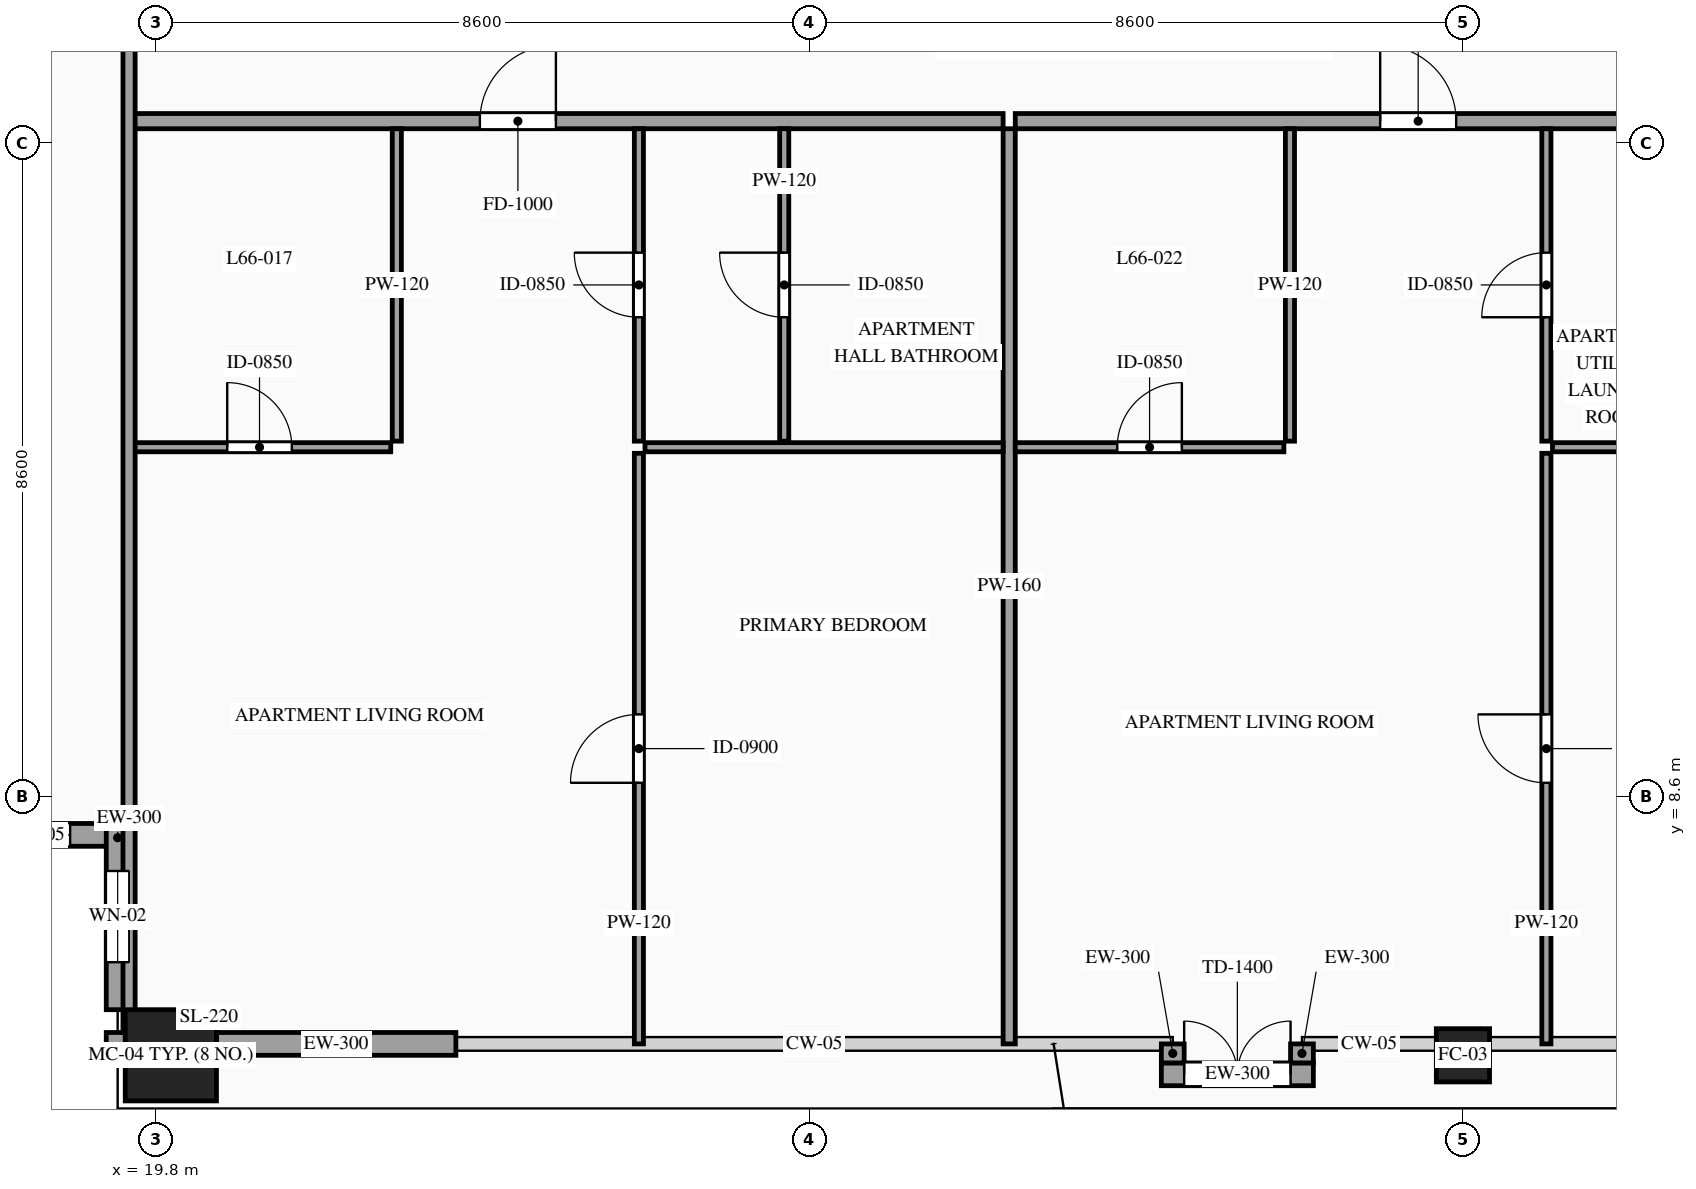
"""IFC4 building model, lengths in metres.
Left out: names, types, materials, properties, quantities, classifications, styles, units other than length and angle.
Written with IfcOpenShell. Run it as: python <this file> out.ifc"""

import sys

from ifc_helpers import new_model, si_unit, direction, frame, frame_2d, origin, origin_2d, place, context, subcontext, project, spatial, rectangle, hollow_rectangle, extrude, source, transform, mapped, element, fill, save


model = new_model("IFC4")
c1 = context("Model", 3, precision=1e-05, world=origin(), true_north=direction((0.0, 1.0)))
c2 = subcontext(c1, "Body", "Model", "MODEL_VIEW")
j1 = project(units=[si_unit("LENGTHUNIT", "METRE"), si_unit("PLANEANGLEUNIT", "RADIAN")], contexts=[c1])
p1 = place(None, origin())
s1 = spatial("IfcSite", under=j1, at=p1, CompositionType="ELEMENT")
p2 = place(p1, origin())
s2 = spatial("IfcBuilding", under=s1, at=p2, CompositionType="ELEMENT")
p3 = place(p2, frame((0.0, 0.0, 248.6)))
s3 = spatial("IfcBuildingStorey", under=s2, at=p3, CompositionType="ELEMENT", Elevation=248.6)
m1 = source(origin(), c2, "Body", "SweptSolid", [
    extrude(hollow_rectangle(XDim=1.2, YDim=1.2, WallThickness=0.055, at=origin_2d()), origin(), (0.0, 0.0, 1.0), 3.5),
])
p4 = place(p3, frame((20.0, 5.2, 0.0), z_axis=(0.0, 0.0, 1.0), x_axis=(1.0, 0.0, 0.0)))
e1 = element("IfcColumn", 1, at=p4, inside=s3, PredefinedType="COLUMN", context=c2, shape_type="MappedRepresentation", body=[
    mapped(m1, transform((0.0, 0.0, 0.0), scale=1.0)),
])
m2 = source(origin(), c2, "Body", "SweptSolid", [
    extrude(hollow_rectangle(XDim=0.7, YDim=0.7, WallThickness=0.032, at=origin_2d()), origin(), (0.0, 0.0, 1.0), 3.5),
])
p5 = place(p3, frame((37.0, 5.2, 0.0), z_axis=(0.0, 0.0, 1.0), x_axis=(1.0, 0.0, 0.0)))
e2 = element("IfcColumn", 2, at=p5, inside=s3, PredefinedType="COLUMN", context=c2, shape_type="MappedRepresentation", body=[
    mapped(m2, transform((0.0, 0.0, 0.0), scale=1.0)),
])
p6 = place(p3, frame((17.0, 8.1, 0.0), z_axis=(0.0, 0.0, 1.0), x_axis=(1.0, 0.0, 0.0)))
e3 = element("IfcWall", 3, at=p6, inside=s3, PredefinedType="SOLIDWALL", context=c2, shape_type="SweptSolid", body=[
    extrude(rectangle(XDim=2.45, YDim=0.3, at=frame_2d((1.225, 0.0))), origin(), (0.0, 0.0, 1.0), 3.28),
])
p7 = place(p6, frame((0.775, 0.0, 0.85)))
e4 = element("IfcOpeningElement", 4, at=p7, cuts=e3, PredefinedType="OPENING", context=c2, shape_type="SweptSolid", body=[
    extrude(rectangle(XDim=0.9, YDim=1.5, at=frame_2d((0.45, 0.75))), frame((0.0, 0.165, 0.0), z_axis=(0.0, -1.0, 0.0), x_axis=(1.0, 0.0, 0.0)), (0.0, 0.0, 1.0), 0.33),
])
p8 = place(p3, frame((19.3, 8.25, 0.0), z_axis=(0.0, 0.0, 1.0), x_axis=(0.0, -1.0, 0.0)))
e5 = element("IfcWall", 5, at=p8, inside=s3, PredefinedType="SOLIDWALL", context=c2, shape_type="SweptSolid", body=[
    extrude(rectangle(XDim=2.45, YDim=0.3, at=frame_2d((1.225, 0.0))), origin(), (0.0, 0.0, 1.0), 3.28),
])
p9 = place(p8, frame((0.625, 0.0, 0.85)))
e6 = element("IfcOpeningElement", 6, at=p9, cuts=e5, PredefinedType="OPENING", context=c2, shape_type="SweptSolid", body=[
    extrude(rectangle(XDim=1.2, YDim=2.1, at=frame_2d((0.6, 1.05))), frame((0.0, 0.165, 0.0), z_axis=(0.0, -1.0, 0.0), x_axis=(1.0, 0.0, 0.0)), (0.0, 0.0, 1.0), 0.33),
])
m3 = source(origin(), c2, "Body", "SweptSolid", [
    extrude(rectangle(XDim=0.25, YDim=0.3, at=frame_2d((0.125, 0.0))), origin(), (0.0, 0.0, 1.0), 3.28),
])
p10 = place(p3, frame((19.15, 5.35, 0.0), z_axis=(0.0, 0.0, 1.0), x_axis=(1.0, 0.0, 0.0)))
e7 = element("IfcWall", 7, at=p10, inside=s3, PredefinedType="SOLIDWALL", context=c2, shape_type="MappedRepresentation", body=[
    mapped(m3, transform((0.0, 0.0, 0.0), scale=1.0)),
])
m4 = source(origin(), c2, "Body", "SweptSolid", [
    extrude(rectangle(XDim=3.15, YDim=0.3, at=frame_2d((1.575, 0.0))), origin(), (0.0, 0.0, 1.0), 2.835),
])
p11 = place(p3, frame((20.6, 5.35, 0.0), z_axis=(0.0, 0.0, 1.0), x_axis=(1.0, 0.0, 0.0)))
e8 = element("IfcWall", 8, at=p11, inside=s3, PredefinedType="SOLIDWALL", context=c2, shape_type="MappedRepresentation", body=[
    mapped(m4, transform((0.0, 0.0, 0.0), scale=1.0)),
])
p12 = place(p3, frame((33.032, 4.95, 0.0), z_axis=(0.0, 0.0, 1.0), x_axis=(1.0, 0.0, 0.0)))
e9 = element("IfcWall", 9, at=p12, inside=s3, PredefinedType="SOLIDWALL", context=c2, shape_type="SweptSolid", body=[
    extrude(rectangle(XDim=2.0, YDim=0.3, at=frame_2d((1.0, 0.0))), origin(), (0.0, 0.0, 1.0), 2.835),
])
p13 = place(p12, frame((0.3, 0.0, 0.0)))
e10 = element("IfcOpeningElement", 10, at=p13, cuts=e9, PredefinedType="OPENING", context=c2, shape_type="SweptSolid", body=[
    extrude(rectangle(XDim=1.4, YDim=2.3, at=frame_2d((0.7, 1.15))), frame((0.0, 0.165, 0.0), z_axis=(0.0, -1.0, 0.0), x_axis=(1.0, 0.0, 0.0)), (0.0, 0.0, 1.0), 0.33),
])
for number, where, z_axis, x_axis in (
    (11, (33.182, 5.35, 0.0), (0.0, 0.0, 1.0), (0.0, -1.0, 0.0)),
    (12, (34.882, 5.1, 0.0), (0.0, 0.0, 1.0), (0.0, 1.0, 0.0)),
):
    element("IfcWall", number, at=place(p3, frame(where, z_axis=z_axis, x_axis=x_axis)), inside=s3, PredefinedType="SOLIDWALL", context=c2, shape_type="MappedRepresentation", body=[
        mapped(m3, transform((0.0, 0.0, 0.0), scale=1.0)),
    ])
p14 = place(p3, frame((19.44, 17.49, 0.0), z_axis=(0.0, 0.0, 1.0), x_axis=(1.0, 0.0, 0.0)))
e13 = element("IfcWall", 13, at=p14, inside=s3, PredefinedType="PARTITIONING", context=c2, shape_type="SweptSolid", body=[
    extrude(rectangle(XDim=11.51, YDim=0.2, at=frame_2d((5.755, 0.0))), origin(), (0.0, 0.0, 1.0), 3.28),
])
p15 = place(p14, frame((4.626, 0.0, 0.0)))
e14 = element("IfcOpeningElement", 14, at=p15, cuts=e13, PredefinedType="OPENING", context=c2, shape_type="SweptSolid", body=[
    extrude(rectangle(XDim=1.0, YDim=2.2, at=frame_2d((0.5, 1.1))), frame((0.0, 0.115, 0.0), z_axis=(0.0, -1.0, 0.0), x_axis=(1.0, 0.0, 0.0)), (0.0, 0.0, 1.0), 0.23),
])
m5 = source(origin(), c2, "Body", "SweptSolid", [
    extrude(rectangle(XDim=12.04, YDim=0.16, at=frame_2d((6.02, 0.0))), origin(), (0.0, 0.0, 1.0), 3.28),
])
p16 = place(p3, frame((31.03, 5.35, 0.0), z_axis=(0.0, 0.0, 1.0), x_axis=(0.0, 1.0, 0.0)))
e15 = element("IfcWall", 15, at=p16, inside=s3, PredefinedType="PARTITIONING", context=c2, shape_type="MappedRepresentation", body=[
    mapped(m5, transform((0.0, 0.0, 0.0), scale=1.0)),
])
p17 = place(p3, frame((19.44, 13.2, 0.0), z_axis=(0.0, 0.0, 1.0), x_axis=(1.0, 0.0, 0.0)))
e16 = element("IfcWall", 16, at=p17, inside=s3, PredefinedType="PARTITIONING", context=c2, shape_type="SweptSolid", body=[
    extrude(rectangle(XDim=3.453, YDim=0.12, at=frame_2d((1.727, 0.0))), origin(), (0.0, 0.0, 1.0), 3.28),
])
p18 = place(p17, frame((1.302, 0.0, 0.0)))
e17 = element("IfcOpeningElement", 17, at=p18, cuts=e16, PredefinedType="OPENING", context=c2, shape_type="SweptSolid", body=[
    extrude(rectangle(XDim=0.85, YDim=2.1, at=frame_2d((0.425, 1.05))), frame((0.0, 0.075, 0.0), z_axis=(0.0, -1.0, 0.0), x_axis=(1.0, 0.0, 0.0)), (0.0, 0.0, 1.0), 0.15),
])
m6 = source(origin(), c2, "Body", "SweptSolid", [
    extrude(rectangle(XDim=4.11, YDim=0.12, at=frame_2d((2.055, 0.0))), origin(), (0.0, 0.0, 1.0), 3.28),
])
p19 = place(p3, frame((22.973, 13.28, 0.0), z_axis=(0.0, 0.0, 1.0), x_axis=(0.0, 1.0, 0.0)))
e18 = element("IfcWall", 18, at=p19, inside=s3, PredefinedType="PARTITIONING", context=c2, shape_type="MappedRepresentation", body=[
    mapped(m6, transform((0.0, 0.0, 0.0), scale=1.0)),
])
p20 = place(p3, frame((28.07, 13.28, 0.0), z_axis=(0.0, 0.0, 1.0), x_axis=(0.0, 1.0, 0.0)))
e19 = element("IfcWall", 19, at=p20, inside=s3, PredefinedType="PARTITIONING", context=c2, shape_type="SweptSolid", body=[
    extrude(rectangle(XDim=4.11, YDim=0.12, at=frame_2d((2.055, 0.0))), origin(), (0.0, 0.0, 1.0), 3.28),
])
p21 = place(p20, frame((1.63, 0.0, 0.0)))
e20 = element("IfcOpeningElement", 20, at=p21, cuts=e19, PredefinedType="OPENING", context=c2, shape_type="SweptSolid", body=[
    extrude(rectangle(XDim=0.85, YDim=2.1, at=frame_2d((0.425, 1.05))), frame((0.0, 0.075, 0.0), z_axis=(0.0, -1.0, 0.0), x_axis=(1.0, 0.0, 0.0)), (0.0, 0.0, 1.0), 0.15),
])
m7 = source(origin(), c2, "Body", "SweptSolid", [
    extrude(rectangle(XDim=4.712, YDim=0.12, at=frame_2d((2.356, 0.0))), origin(), (0.0, 0.0, 1.0), 3.28),
])
p22 = place(p3, frame((26.238, 13.2, 0.0), z_axis=(0.0, 0.0, 1.0), x_axis=(1.0, 0.0, 0.0)))
e21 = element("IfcWall", 21, at=p22, inside=s3, PredefinedType="PARTITIONING", context=c2, shape_type="MappedRepresentation", body=[
    mapped(m7, transform((0.0, 0.0, 0.0), scale=1.0)),
])
p23 = place(p3, frame((26.158, 5.35, 0.0), z_axis=(0.0, 0.0, 1.0), x_axis=(0.0, 1.0, 0.0)))
e22 = element("IfcWall", 22, at=p23, inside=s3, PredefinedType="PARTITIONING", context=c2, shape_type="SweptSolid", body=[
    extrude(rectangle(XDim=7.77, YDim=0.12, at=frame_2d((3.885, 0.0))), origin(), (0.0, 0.0, 1.0), 3.28),
])
p24 = place(p23, frame((3.435, 0.0, 0.0)))
e23 = element("IfcOpeningElement", 23, at=p24, cuts=e22, PredefinedType="OPENING", context=c2, shape_type="SweptSolid", body=[
    extrude(rectangle(XDim=0.9, YDim=2.15, at=frame_2d((0.45, 1.075))), frame((0.0, 0.075, 0.0), z_axis=(0.0, -1.0, 0.0), x_axis=(1.0, 0.0, 0.0)), (0.0, 0.0, 1.0), 0.15),
])
p25 = place(p3, frame((26.158, 13.28, 0.0), z_axis=(0.0, 0.0, 1.0), x_axis=(0.0, 1.0, 0.0)))
e24 = element("IfcWall", 24, at=p25, inside=s3, PredefinedType="PARTITIONING", context=c2, shape_type="SweptSolid", body=[
    extrude(rectangle(XDim=4.11, YDim=0.12, at=frame_2d((2.055, 0.0))), origin(), (0.0, 0.0, 1.0), 3.28),
])
p26 = place(p25, frame((1.63, 0.0, 0.0)))
e25 = element("IfcOpeningElement", 25, at=p26, cuts=e24, PredefinedType="OPENING", context=c2, shape_type="SweptSolid", body=[
    extrude(rectangle(XDim=0.85, YDim=2.1, at=frame_2d((0.425, 1.05))), frame((0.0, 0.075, 0.0), z_axis=(0.0, -1.0, 0.0), x_axis=(1.0, 0.0, 0.0)), (0.0, 0.0, 1.0), 0.15),
])
p27 = place(p3, frame((31.11, 17.49, 0.0), z_axis=(0.0, 0.0, 1.0), x_axis=(1.0, 0.0, 0.0)))
e26 = element("IfcWall", 26, at=p27, inside=s3, PredefinedType="PARTITIONING", context=c2, shape_type="SweptSolid", body=[
    extrude(rectangle(XDim=11.78, YDim=0.2, at=frame_2d((5.89, 0.0))), origin(), (0.0, 0.0, 1.0), 3.28),
])
p28 = place(p27, frame((4.801, 0.0, 0.0)))
e27 = element("IfcOpeningElement", 27, at=p28, cuts=e26, PredefinedType="OPENING", context=c2, shape_type="SweptSolid", body=[
    extrude(rectangle(XDim=1.0, YDim=2.2, at=frame_2d((0.5, 1.1))), frame((0.0, 0.115, 0.0), z_axis=(0.0, -1.0, 0.0), x_axis=(1.0, 0.0, 0.0)), (0.0, 0.0, 1.0), 0.23),
])
p29 = place(p3, frame((31.11, 13.2, 0.0), z_axis=(0.0, 0.0, 1.0), x_axis=(1.0, 0.0, 0.0)))
e28 = element("IfcWall", 28, at=p29, inside=s3, PredefinedType="PARTITIONING", context=c2, shape_type="SweptSolid", body=[
    extrude(rectangle(XDim=3.534, YDim=0.12, at=frame_2d((1.767, 0.0))), origin(), (0.0, 0.0, 1.0), 3.28),
])
p30 = place(p29, frame((1.342, 0.0, 0.0)))
e29 = element("IfcOpeningElement", 29, at=p30, cuts=e28, PredefinedType="OPENING", context=c2, shape_type="SweptSolid", body=[
    extrude(rectangle(XDim=0.85, YDim=2.1, at=frame_2d((0.425, 1.05))), frame((0.0, 0.075, 0.0), z_axis=(0.0, -1.0, 0.0), x_axis=(1.0, 0.0, 0.0)), (0.0, 0.0, 1.0), 0.15),
])
p31 = place(p3, frame((34.724, 13.28, 0.0), z_axis=(0.0, 0.0, 1.0), x_axis=(0.0, 1.0, 0.0)))
e30 = element("IfcWall", 30, at=p31, inside=s3, PredefinedType="PARTITIONING", context=c2, shape_type="MappedRepresentation", body=[
    mapped(m6, transform((0.0, 0.0, 0.0), scale=1.0)),
])
p32 = place(p3, frame((38.178, 13.2, 0.0), z_axis=(0.0, 0.0, 1.0), x_axis=(1.0, 0.0, 0.0)))
e31 = element("IfcWall", 31, at=p32, inside=s3, PredefinedType="PARTITIONING", context=c2, shape_type="MappedRepresentation", body=[
    mapped(m7, transform((0.0, 0.0, 0.0), scale=1.0)),
])
p33 = place(p3, frame((38.098, 5.35, 0.0), z_axis=(0.0, 0.0, 1.0), x_axis=(0.0, 1.0, 0.0)))
e32 = element("IfcWall", 32, at=p33, inside=s3, PredefinedType="PARTITIONING", context=c2, shape_type="SweptSolid", body=[
    extrude(rectangle(XDim=7.77, YDim=0.12, at=frame_2d((3.885, 0.0))), origin(), (0.0, 0.0, 1.0), 3.28),
])
p34 = place(p33, frame((3.435, 0.0, 0.0)))
e33 = element("IfcOpeningElement", 33, at=p34, cuts=e32, PredefinedType="OPENING", context=c2, shape_type="SweptSolid", body=[
    extrude(rectangle(XDim=0.9, YDim=2.15, at=frame_2d((0.45, 1.075))), frame((0.0, 0.075, 0.0), z_axis=(0.0, -1.0, 0.0), x_axis=(1.0, 0.0, 0.0)), (0.0, 0.0, 1.0), 0.15),
])
p35 = place(p3, frame((38.098, 13.28, 0.0), z_axis=(0.0, 0.0, 1.0), x_axis=(0.0, 1.0, 0.0)))
e34 = element("IfcWall", 34, at=p35, inside=s3, PredefinedType="PARTITIONING", context=c2, shape_type="SweptSolid", body=[
    extrude(rectangle(XDim=4.11, YDim=0.12, at=frame_2d((2.055, 0.0))), origin(), (0.0, 0.0, 1.0), 3.28),
])
p36 = place(p35, frame((1.63, 0.0, 0.0)))
e35 = element("IfcOpeningElement", 35, at=p36, cuts=e34, PredefinedType="OPENING", context=c2, shape_type="SweptSolid", body=[
    extrude(rectangle(XDim=0.85, YDim=2.1, at=frame_2d((0.425, 1.05))), frame((0.0, 0.075, 0.0), z_axis=(0.0, -1.0, 0.0), x_axis=(1.0, 0.0, 0.0)), (0.0, 0.0, 1.0), 0.15),
])
m8 = source(origin(), c2, "Body", "SweptSolid", [
    extrude(rectangle(XDim=26.69, YDim=0.16, at=frame_2d((13.345, 0.0))), origin(), (0.0, 0.0, 1.0), 3.28),
])
p37 = place(p3, frame((19.45, 5.5, 0.0), z_axis=(0.0, 0.0, 1.0), x_axis=(0.0, 1.0, 0.0)))
e36 = element("IfcWall", 36, at=p37, inside=s3, PredefinedType="PARTITIONING", context=c2, shape_type="MappedRepresentation", body=[
    mapped(m8, transform((0.0, 0.0, 0.0), scale=1.0)),
])
m9 = source(origin(), c2, "Body", "SweptSolid", [
    extrude(rectangle(XDim=0.9, YDim=1.5, at=frame_2d((0.45, 0.75))), frame((0.0, 0.03, 0.0), z_axis=(0.0, -1.0, 0.0), x_axis=(1.0, 0.0, 0.0)), (0.0, 0.0, 1.0), 0.06),
])
p38 = place(p7, origin())
e37 = element("IfcWindow", 37, at=p38, inside=s3, PartitioningType="SINGLE_PANEL", PredefinedType="WINDOW", context=c2, shape_type="MappedRepresentation", body=[
    mapped(m9, transform((0.0, 0.0, 0.0), scale=1.0)),
])
fill(e4, e37)
m10 = source(origin(), c2, "Body", "SweptSolid", [
    extrude(rectangle(XDim=1.2, YDim=2.1, at=frame_2d((0.6, 1.05))), frame((0.0, 0.03, 0.0), z_axis=(0.0, -1.0, 0.0), x_axis=(1.0, 0.0, 0.0)), (0.0, 0.0, 1.0), 0.06),
])
p39 = place(p9, origin())
e38 = element("IfcWindow", 38, at=p39, inside=s3, PartitioningType="SINGLE_PANEL", PredefinedType="WINDOW", context=c2, shape_type="MappedRepresentation", body=[
    mapped(m10, transform((0.0, 0.0, 0.0), scale=1.0)),
])
fill(e6, e38)
m11 = source(origin(), c2, "Body", "SweptSolid", [
    extrude(rectangle(XDim=1.4, YDim=2.3, at=frame_2d((0.7, 1.15))), frame((0.0, 0.025, 0.0), z_axis=(0.0, -1.0, 0.0), x_axis=(1.0, 0.0, 0.0)), (0.0, 0.0, 1.0), 0.05),
])
p40 = place(p13, origin())
e39 = element("IfcDoor", 39, at=p40, inside=s3, OperationType="DOUBLE_DOOR_SINGLE_SWING", PredefinedType="DOOR", context=c2, shape_type="MappedRepresentation", body=[
    mapped(m11, transform((0.0, 0.0, 0.0), scale=1.0)),
])
fill(e10, e39)
m12 = source(origin(), c2, "Body", "SweptSolid", [
    extrude(rectangle(XDim=1.0, YDim=2.2, at=frame_2d((0.5, 1.1))), frame((0.0, 0.025, 0.0), z_axis=(0.0, -1.0, 0.0), x_axis=(1.0, 0.0, 0.0)), (0.0, 0.0, 1.0), 0.05),
])
p41 = place(p15, origin())
e40 = element("IfcDoor", 40, at=p41, inside=s3, OperationType="SINGLE_SWING_RIGHT", PredefinedType="DOOR", context=c2, shape_type="MappedRepresentation", body=[
    mapped(m12, transform((0.0, 0.0, 0.0), scale=1.0)),
])
fill(e14, e40)
m13 = source(origin(), c2, "Body", "SweptSolid", [
    extrude(rectangle(XDim=0.85, YDim=2.1, at=frame_2d((0.425, 1.05))), frame((0.0, 0.025, 0.0), z_axis=(0.0, -1.0, 0.0), x_axis=(1.0, 0.0, 0.0)), (0.0, 0.0, 1.0), 0.05),
])
p42 = place(p18, origin())
e41 = element("IfcDoor", 41, at=p42, inside=s3, OperationType="SINGLE_SWING_LEFT", PredefinedType="DOOR", context=c2, shape_type="MappedRepresentation", body=[
    mapped(m13, transform((0.0, 0.0, 0.0), scale=1.0)),
])
fill(e17, e41)
p43 = place(p21, origin())
e42 = element("IfcDoor", 42, at=p43, inside=s3, OperationType="SINGLE_SWING_RIGHT", PredefinedType="DOOR", context=c2, shape_type="MappedRepresentation", body=[
    mapped(m13, transform((0.0, 0.0, 0.0), scale=1.0)),
])
fill(e20, e42)
m14 = source(origin(), c2, "Body", "SweptSolid", [
    extrude(rectangle(XDim=0.9, YDim=2.15, at=frame_2d((0.45, 1.075))), frame((0.0, 0.025, 0.0), z_axis=(0.0, -1.0, 0.0), x_axis=(1.0, 0.0, 0.0)), (0.0, 0.0, 1.0), 0.05),
])
p44 = place(p24, origin())
e43 = element("IfcDoor", 43, at=p44, inside=s3, OperationType="SINGLE_SWING_LEFT", PredefinedType="DOOR", context=c2, shape_type="MappedRepresentation", body=[
    mapped(m14, transform((0.0, 0.0, 0.0), scale=1.0)),
])
fill(e23, e43)
p45 = place(p26, origin())
e44 = element("IfcDoor", 44, at=p45, inside=s3, OperationType="SINGLE_SWING_RIGHT", PredefinedType="DOOR", context=c2, shape_type="MappedRepresentation", body=[
    mapped(m13, transform((0.0, 0.0, 0.0), scale=1.0)),
])
fill(e25, e44)
p46 = place(p28, origin())
e45 = element("IfcDoor", 45, at=p46, inside=s3, OperationType="SINGLE_SWING_LEFT", PredefinedType="DOOR", context=c2, shape_type="MappedRepresentation", body=[
    mapped(m12, transform((0.0, 0.0, 0.0), scale=1.0)),
])
fill(e27, e45)
p47 = place(p30, origin())
e46 = element("IfcDoor", 46, at=p47, inside=s3, OperationType="SINGLE_SWING_RIGHT", PredefinedType="DOOR", context=c2, shape_type="MappedRepresentation", body=[
    mapped(m13, transform((0.0, 0.0, 0.0), scale=1.0)),
])
fill(e29, e46)
p48 = place(p34, origin())
e47 = element("IfcDoor", 47, at=p48, inside=s3, OperationType="SINGLE_SWING_RIGHT", PredefinedType="DOOR", context=c2, shape_type="MappedRepresentation", body=[
    mapped(m14, transform((0.0, 0.0, 0.0), scale=1.0)),
])
fill(e33, e47)
p49 = place(p36, origin())
e48 = element("IfcDoor", 48, at=p49, inside=s3, OperationType="SINGLE_SWING_LEFT", PredefinedType="DOOR", context=c2, shape_type="MappedRepresentation", body=[
    mapped(m13, transform((0.0, 0.0, 0.0), scale=1.0)),
])
fill(e35, e48)
save(model, sys.argv[1])
